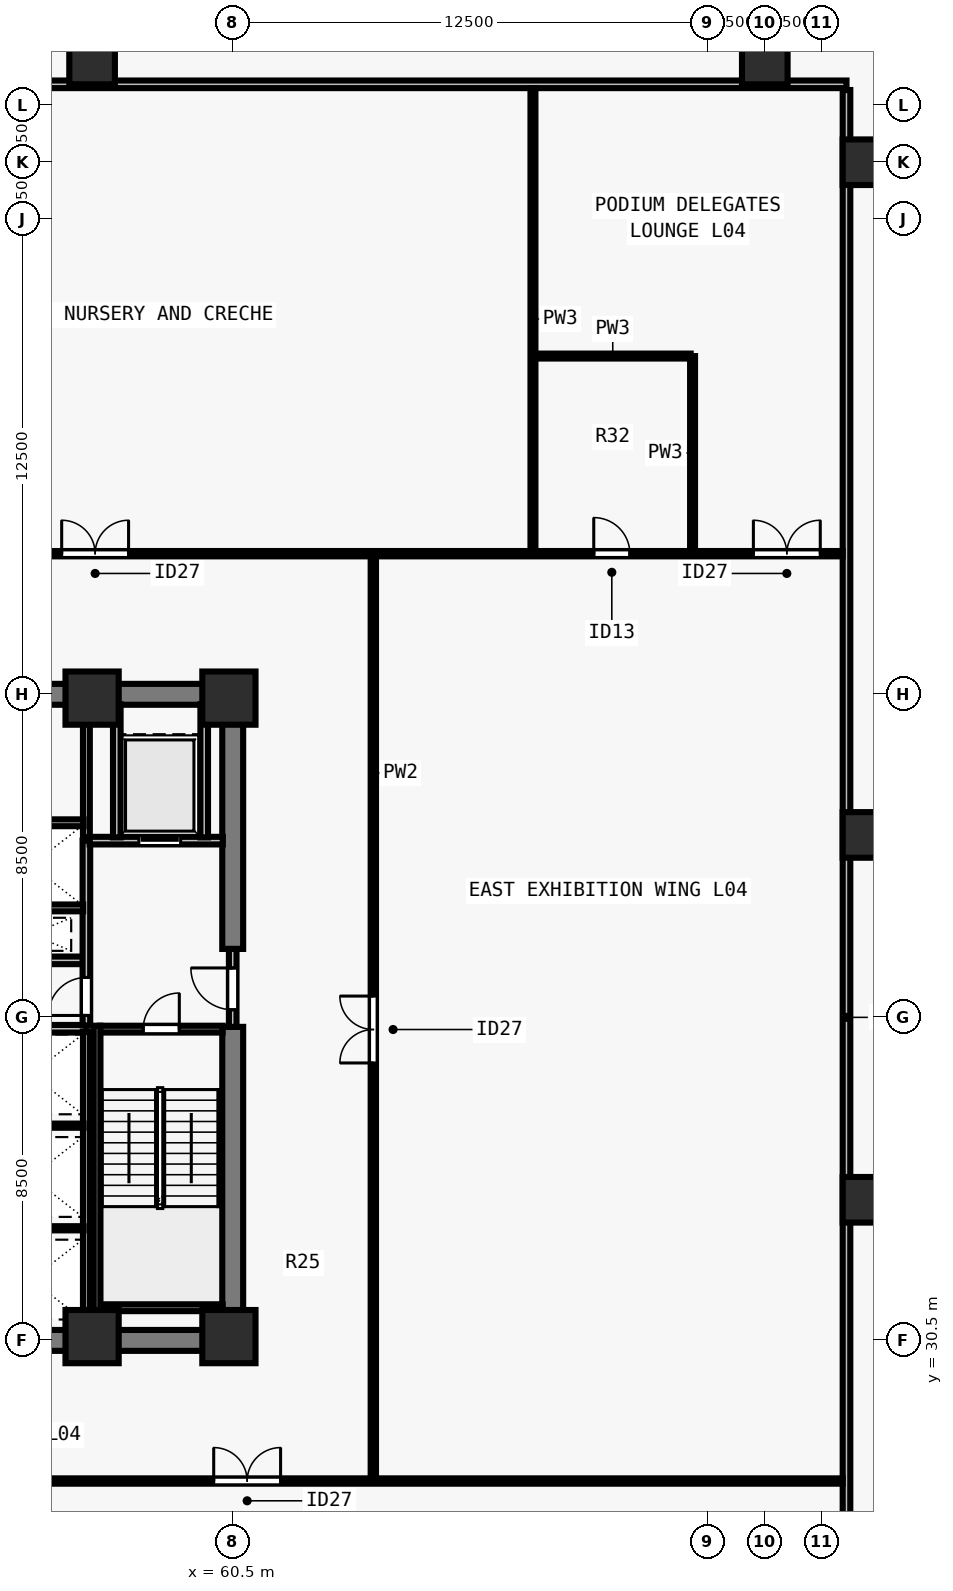
"""IFC4 building model, lengths in metres.
Left out: names, types, materials, properties, quantities, classifications, styles, units other than length and angle.
Written with IfcOpenShell. Run it as: python <this file> out.ifc"""

import sys

from ifc_helpers import new_model, si_unit, direction, frame, frame_2d, origin, origin_2d, place, context, subcontext, project, spatial, rectangle, extrude, element, fill, save


model = new_model("IFC4")
c1 = context("Model", 3, precision=1e-05, world=origin(), true_north=direction((0.0, 1.0)))
c2 = subcontext(c1, "Body", "Model", "MODEL_VIEW")
j1 = project(units=[si_unit("LENGTHUNIT", "METRE"), si_unit("PLANEANGLEUNIT", "RADIAN")], contexts=[c1])
p1 = place(None, origin())
s1 = spatial("IfcSite", under=j1, at=p1, CompositionType="ELEMENT")
p2 = place(p1, origin())
s2 = spatial("IfcBuilding", under=s1, at=p2, CompositionType="ELEMENT")
p3 = place(p2, frame((0.0, 0.0, 19.0)))
s3 = spatial("IfcBuildingStorey", under=s2, at=p3, CompositionType="ELEMENT", Elevation=19.0)
for number, where, z_axis, x_axis in (
    (1, (56.8, 30.6, 0.0), (0.0, 0.0, 1.0), (1.0, 0.0, 0.0)),
    (2, (60.4, 30.6, 0.0), (0.0, 0.0, 1.0), (1.0, 0.0, 0.0)),
    (3, (56.8, 47.4, 0.0), (0.0, 0.0, 1.0), (1.0, 0.0, 0.0)),
    (4, (60.4, 47.4, 0.0), (0.0, 0.0, 1.0), (1.0, 0.0, 0.0)),
):
    element("IfcColumn", number, at=place(p3, frame(where, z_axis=z_axis, x_axis=x_axis)), inside=s3, PredefinedType="COLUMN", context=c2, shape_type="SweptSolid", body=[
        extrude(rectangle(XDim=1.4, YDim=1.4, at=origin_2d()), origin(), (0.0, 0.0, 1.0), 4.5),
    ])
for number, where, z_axis, x_axis in (
    (5, (77.15, 34.2, 0.0), (0.0, 0.0, 1.0), (1.0, 0.0, 0.0)),
    (6, (77.15, 43.8, 0.0), (0.0, 0.0, 1.0), (1.0, 0.0, 0.0)),
    (7, (77.15, 61.5, 0.0), (0.0, 0.0, 1.0), (1.0, 0.0, 0.0)),
    (8, (74.5, 64.15, 0.0), (0.0, 0.0, 1.0), (1.0, 0.0, 0.0)),
    (9, (56.8, 64.15, 0.0), (0.0, 0.0, 1.0), (1.0, 0.0, 0.0)),
):
    element("IfcColumn", number, at=place(p3, frame(where, z_axis=z_axis, x_axis=x_axis)), inside=s3, PredefinedType="COLUMN", context=c2, shape_type="SweptSolid", body=[
        extrude(rectangle(XDim=1.2, YDim=1.2, at=origin_2d()), origin(), (0.0, 0.0, 1.0), 4.5),
    ])
for number, where, z_axis, x_axis in (
    (10, (43.225, 30.5, 0.0), (0.0, 0.0, 1.0), (1.0, 0.0, 0.0)),
    (11, (43.225, 47.5, 0.0), (0.0, 0.0, 1.0), (1.0, 0.0, 0.0)),
):
    element("IfcWall", number, at=place(p3, frame(where, z_axis=z_axis, x_axis=x_axis)), inside=s3, PredefinedType="SHEAR", context=c2, shape_type="SweptSolid", body=[
        extrude(rectangle(XDim=17.55, YDim=0.55, at=frame_2d((8.775, 0.0))), origin(), (0.0, 0.0, 1.0), 4.28),
    ])
p4 = place(p3, frame((60.5, 30.765, 0.0), z_axis=(0.0, 0.0, 1.0), x_axis=(0.0, 1.0, 0.0)))
e12 = element("IfcWall", 12, at=p4, inside=s3, PredefinedType="SHEAR", context=c2, shape_type="SweptSolid", body=[
    extrude(rectangle(XDim=7.985, YDim=0.55, at=frame_2d((3.993, 0.0))), origin(), (0.0, 0.0, 1.0), 4.28),
])
p5 = place(p3, frame((60.5, 40.8, 0.0), z_axis=(0.0, 0.0, 1.0), x_axis=(0.0, 1.0, 0.0)))
e13 = element("IfcWall", 13, at=p5, inside=s3, PredefinedType="SHEAR", context=c2, shape_type="SweptSolid", body=[
    extrude(rectangle(XDim=6.435, YDim=0.55, at=frame_2d((3.218, 0.0))), origin(), (0.0, 0.0, 1.0), 4.28),
])
for number, where, z_axis, x_axis in (
    (14, (53.7, 38.7, 0.0), (0.0, 0.0, 1.0), (1.0, 0.0, 0.0)),
    (15, (53.7, 40.5, 0.0), (0.0, 0.0, 1.0), (1.0, 0.0, 0.0)),
):
    element("IfcWall", number, at=place(p3, frame(where, z_axis=z_axis, x_axis=x_axis)), inside=s3, PredefinedType="SOLIDWALL", context=c2, shape_type="SweptSolid", body=[
        extrude(rectangle(XDim=2.95, YDim=0.2, at=frame_2d((1.475, 0.0))), origin(), (0.0, 0.0, 1.0), 4.28),
    ])
p6 = place(p3, frame((60.5, 38.75, 0.0), z_axis=(0.0, 0.0, 1.0), x_axis=(0.0, 1.0, 0.0)))
e16 = element("IfcWall", 16, at=p6, inside=s3, PredefinedType="SOLIDWALL", context=c2, shape_type="SweptSolid", body=[
    extrude(rectangle(XDim=2.05, YDim=0.2, at=frame_2d((1.025, 0.0))), origin(), (0.0, 0.0, 1.0), 4.28),
])
p7 = place(p6, frame((0.45, 0.0, 0.0)))
e17 = element("IfcOpeningElement", 17, at=p7, cuts=e16, PredefinedType="OPENING", context=c2, shape_type="SweptSolid", body=[
    extrude(rectangle(XDim=1.1, YDim=2.15, at=frame_2d((0.55, 1.075))), frame((0.0, 0.11, 0.0), z_axis=(0.0, -1.0, 0.0), x_axis=(1.0, 0.0, 0.0)), (0.0, 0.0, 1.0), 0.22),
])
p8 = place(p3, frame((56.65, 38.785, 0.0), z_axis=(0.0, 0.0, 1.0), x_axis=(0.0, 1.0, 0.0)))
e18 = element("IfcWall", 18, at=p8, inside=s3, PredefinedType="SOLIDWALL", context=c2, shape_type="SweptSolid", body=[
    extrude(rectangle(XDim=4.865, YDim=0.2, at=frame_2d((2.433, 0.0))), origin(), (0.0, 0.0, 1.0), 4.28),
])
p9 = place(p8, frame((0.265, 0.0, 0.0)))
e19 = element("IfcOpeningElement", 19, at=p9, cuts=e18, PredefinedType="OPENING", context=c2, shape_type="SweptSolid", body=[
    extrude(rectangle(XDim=1.0, YDim=2.15, at=frame_2d((0.5, 1.075))), frame((0.0, 0.11, 0.0), z_axis=(0.0, -1.0, 0.0), x_axis=(1.0, 0.0, 0.0)), (0.0, 0.0, 1.0), 0.22),
])
p10 = place(p3, frame((56.735, 43.65, 0.0), z_axis=(0.0, 0.0, 1.0), x_axis=(1.0, 0.0, 0.0)))
e20 = element("IfcWall", 20, at=p10, inside=s3, PredefinedType="SOLIDWALL", context=c2, shape_type="SweptSolid", body=[
    extrude(rectangle(XDim=3.505, YDim=0.2, at=frame_2d((1.752, 0.0))), origin(), (0.0, 0.0, 1.0), 4.28),
])
p11 = place(p10, frame((1.295, 0.0, 0.0)))
e21 = element("IfcOpeningElement", 21, at=p11, cuts=e20, PredefinedType="OPENING", context=c2, shape_type="SweptSolid", body=[
    extrude(rectangle(XDim=1.1, YDim=2.2, at=frame_2d((0.55, 1.1))), frame((0.0, 0.11, 0.0), z_axis=(0.0, -1.0, 0.0), x_axis=(1.0, 0.0, 0.0)), (0.0, 0.0, 1.0), 0.22),
])
for number, where, z_axis, x_axis in (
    (22, (57.45, 43.735, 0.0), (0.0, 0.0, 1.0), (0.0, 1.0, 0.0)),
    (23, (59.75, 43.735, 0.0), (0.0, 0.0, 1.0), (0.0, 1.0, 0.0)),
):
    element("IfcWall", number, at=place(p3, frame(where, z_axis=z_axis, x_axis=x_axis)), inside=s3, PredefinedType="SOLIDWALL", context=c2, shape_type="SweptSolid", body=[
        extrude(rectangle(XDim=3.505, YDim=0.2, at=frame_2d((1.752, 0.0))), origin(), (0.0, 0.0, 1.0), 4.28),
    ])
p12 = place(p3, frame((56.65, 30.76, 0.0), z_axis=(0.0, 0.0, 1.0), x_axis=(0.0, 1.0, 0.0)))
e24 = element("IfcWall", 24, at=p12, inside=s3, PredefinedType="SOLIDWALL", context=c2, shape_type="SweptSolid", body=[
    extrude(rectangle(XDim=7.855, YDim=0.18, at=frame_2d((3.927, 0.0))), origin(), (0.0, 0.0, 1.0), 4.28),
])
for number, where, z_axis, x_axis in (
    (25, (53.785, 33.45, 0.0), (0.0, 0.0, 1.0), (1.0, 0.0, 0.0)),
    (26, (53.785, 36.15, 0.0), (0.0, 0.0, 1.0), (1.0, 0.0, 0.0)),
):
    element("IfcWall", number, at=place(p3, frame(where, z_axis=z_axis, x_axis=x_axis)), inside=s3, PredefinedType="PARTITIONING", context=c2, shape_type="SweptSolid", body=[
        extrude(rectangle(XDim=2.79, YDim=0.11, at=frame_2d((1.395, 0.0))), origin(), (0.0, 0.0, 1.0), 4.28),
    ])
p13 = place(p3, frame((56.65, 43.735, 0.0), z_axis=(0.0, 0.0, 1.0), x_axis=(0.0, 1.0, 0.0)))
e27 = element("IfcWall", 27, at=p13, inside=s3, PredefinedType="SOLIDWALL", context=c2, shape_type="SweptSolid", body=[
    extrude(rectangle(XDim=3.505, YDim=0.18, at=frame_2d((1.752, 0.0))), origin(), (0.0, 0.0, 1.0), 4.28),
])
p14 = place(p3, frame((53.785, 41.88, 0.0), z_axis=(0.0, 0.0, 1.0), x_axis=(1.0, 0.0, 0.0)))
e28 = element("IfcWall", 28, at=p14, inside=s3, PredefinedType="SOLIDWALL", context=c2, shape_type="SweptSolid", body=[
    extrude(rectangle(XDim=2.78, YDim=0.18, at=frame_2d((1.39, 0.0))), origin(), (0.0, 0.0, 1.0), 4.28),
])
p15 = place(p3, frame((53.785, 44.12, 0.0), z_axis=(0.0, 0.0, 1.0), x_axis=(1.0, 0.0, 0.0)))
e29 = element("IfcWall", 29, at=p15, inside=s3, PredefinedType="SOLIDWALL", context=c2, shape_type="SweptSolid", body=[
    extrude(rectangle(XDim=2.79, YDim=0.18, at=frame_2d((1.395, 0.0))), origin(), (0.0, 0.0, 1.0), 4.28),
])
p16 = place(p3, frame((27.35, 63.55, 0.0), z_axis=(0.0, 0.0, 1.0), x_axis=(1.0, 0.0, 0.0)))
e30 = element("IfcWall", 30, at=p16, inside=s3, PredefinedType="SOLIDWALL", context=c2, shape_type="SweptSolid", body=[
    extrude(rectangle(XDim=49.3, YDim=0.2, at=frame_2d((24.65, 0.0))), origin(), (0.0, 0.0, 1.0), 2.455),
])
p17 = place(p3, frame((76.65, 14.6, 0.0), z_axis=(0.0, 0.0, 1.0), x_axis=(0.0, 1.0, 0.0)))
e31 = element("IfcWall", 31, at=p17, inside=s3, PredefinedType="SOLIDWALL", context=c2, shape_type="SweptSolid", body=[
    extrude(rectangle(XDim=48.8, YDim=0.2, at=frame_2d((24.4, 0.0))), origin(), (0.0, 0.0, 1.0), 2.455),
])
p18 = place(p3, frame((27.45, 26.8, 0.0), z_axis=(0.0, 0.0, 1.0), x_axis=(1.0, 0.0, 0.0)))
e32 = element("IfcWall", 32, at=p18, inside=s3, PredefinedType="PARTITIONING", context=c2, shape_type="SweptSolid", body=[
    extrude(rectangle(XDim=49.1, YDim=0.14, at=frame_2d((24.55, 0.0))), origin(), (0.0, 0.0, 1.0), 3.798),
])
p19 = place(p18, frame((10.33, 0.0, 0.0)))
e33 = element("IfcOpeningElement", 33, at=p19, cuts=e32, PredefinedType="OPENING", context=c2, shape_type="SweptSolid", body=[
    extrude(rectangle(XDim=1.76, YDim=2.2, at=frame_2d((0.88, 1.1))), frame((0.0, 0.08, 0.0), z_axis=(0.0, -1.0, 0.0), x_axis=(1.0, 0.0, 0.0)), (0.0, 0.0, 1.0), 0.16),
])
p20 = place(p18, frame((32.55, 0.0, 0.0)))
e34 = element("IfcOpeningElement", 34, at=p20, cuts=e32, PredefinedType="OPENING", context=c2, shape_type="SweptSolid", body=[
    extrude(rectangle(XDim=1.76, YDim=2.2, at=frame_2d((0.88, 1.1))), frame((0.0, 0.08, 0.0), z_axis=(0.0, -1.0, 0.0), x_axis=(1.0, 0.0, 0.0)), (0.0, 0.0, 1.0), 0.16),
])
p21 = place(p3, frame((27.45, 51.2, 0.0), z_axis=(0.0, 0.0, 1.0), x_axis=(1.0, 0.0, 0.0)))
e35 = element("IfcWall", 35, at=p21, inside=s3, PredefinedType="PARTITIONING", context=c2, shape_type="SweptSolid", body=[
    extrude(rectangle(XDim=49.1, YDim=0.14, at=frame_2d((24.55, 0.0))), origin(), (0.0, 0.0, 1.0), 3.798),
])
p22 = place(p21, frame((15.75, 0.0, 0.0)))
e36 = element("IfcOpeningElement", 36, at=p22, cuts=e35, PredefinedType="OPENING", context=c2, shape_type="SweptSolid", body=[
    extrude(rectangle(XDim=1.76, YDim=2.2, at=frame_2d((0.88, 1.1))), frame((0.0, 0.08, 0.0), z_axis=(0.0, -1.0, 0.0), x_axis=(1.0, 0.0, 0.0)), (0.0, 0.0, 1.0), 0.16),
])
p23 = place(p21, frame((28.55, 0.0, 0.0)))
e37 = element("IfcOpeningElement", 37, at=p23, cuts=e35, PredefinedType="OPENING", context=c2, shape_type="SweptSolid", body=[
    extrude(rectangle(XDim=1.76, YDim=2.2, at=frame_2d((0.88, 1.1))), frame((0.0, 0.08, 0.0), z_axis=(0.0, -1.0, 0.0), x_axis=(1.0, 0.0, 0.0)), (0.0, 0.0, 1.0), 0.16),
])
p24 = place(p21, frame((42.55, 0.0, 0.0)))
e38 = element("IfcOpeningElement", 38, at=p24, cuts=e35, PredefinedType="OPENING", context=c2, shape_type="SweptSolid", body=[
    extrude(rectangle(XDim=0.95, YDim=2.1, at=frame_2d((0.475, 1.05))), frame((0.0, 0.08, 0.0), z_axis=(0.0, -1.0, 0.0), x_axis=(1.0, 0.0, 0.0)), (0.0, 0.0, 1.0), 0.16),
])
p25 = place(p21, frame((46.75, 0.0, 0.0)))
e39 = element("IfcOpeningElement", 39, at=p25, cuts=e35, PredefinedType="OPENING", context=c2, shape_type="SweptSolid", body=[
    extrude(rectangle(XDim=1.76, YDim=2.2, at=frame_2d((0.88, 1.1))), frame((0.0, 0.08, 0.0), z_axis=(0.0, -1.0, 0.0), x_axis=(1.0, 0.0, 0.0)), (0.0, 0.0, 1.0), 0.16),
])
p26 = place(p3, frame((64.2, 26.855, 0.0), z_axis=(0.0, 0.0, 1.0), x_axis=(0.0, 1.0, 0.0)))
e40 = element("IfcWall", 40, at=p26, inside=s3, PredefinedType="PARTITIONING", context=c2, shape_type="SweptSolid", body=[
    extrude(rectangle(XDim=24.29, YDim=0.14, at=frame_2d((12.145, 0.0))), origin(), (0.0, 0.0, 1.0), 4.28),
])
p27 = place(p26, frame((10.945, 0.0, 0.0)))
e41 = element("IfcOpeningElement", 41, at=p27, cuts=e40, PredefinedType="OPENING", context=c2, shape_type="SweptSolid", body=[
    extrude(rectangle(XDim=1.76, YDim=2.2, at=frame_2d((0.88, 1.1))), frame((0.0, 0.08, 0.0), z_axis=(0.0, -1.0, 0.0), x_axis=(1.0, 0.0, 0.0)), (0.0, 0.0, 1.0), 0.16),
])
p28 = place(p3, frame((68.4, 51.3, 0.0), z_axis=(0.0, 0.0, 1.0), x_axis=(0.0, 1.0, 0.0)))
e42 = element("IfcWall", 42, at=p28, inside=s3, PredefinedType="PLUMBINGWALL", context=c2, shape_type="SweptSolid", body=[
    extrude(rectangle(XDim=12.15, YDim=0.13, at=frame_2d((6.075, 0.0))), origin(), (0.0, 0.0, 1.0), 2.455),
])
p29 = place(p3, frame((72.6, 51.3, 0.0), z_axis=(0.0, 0.0, 1.0), x_axis=(0.0, 1.0, 0.0)))
e43 = element("IfcWall", 43, at=p29, inside=s3, PredefinedType="PLUMBINGWALL", context=c2, shape_type="SweptSolid", body=[
    extrude(rectangle(XDim=5.1, YDim=0.13, at=frame_2d((2.55, 0.0))), origin(), (0.0, 0.0, 1.0), 4.28),
])
p30 = place(p3, frame((68.45, 56.4, 0.0), z_axis=(0.0, 0.0, 1.0), x_axis=(1.0, 0.0, 0.0)))
e44 = element("IfcWall", 44, at=p30, inside=s3, PredefinedType="PLUMBINGWALL", context=c2, shape_type="SweptSolid", body=[
    extrude(rectangle(XDim=4.1, YDim=0.13, at=frame_2d((2.05, 0.0))), origin(), (0.0, 0.0, 1.0), 3.798),
])
p31 = place(p3, frame((57.005, 38.69, 0.0), z_axis=(0.0, 0.0, 1.0), x_axis=(1.0, 0.0, 0.0)))
e45 = element("IfcWall", 45, at=p31, inside=s3, PredefinedType="SOLIDWALL", context=c2, shape_type="SweptSolid", body=[
    extrude(rectangle(XDim=3.23, YDim=0.18, at=frame_2d((1.615, 0.0))), origin(), (0.0, 0.0, 1.0), 4.28),
])
p32 = place(p31, frame((1.14, 0.0, 0.0)))
e46 = element("IfcOpeningElement", 46, at=p32, cuts=e45, PredefinedType="OPENING", context=c2, shape_type="SweptSolid", body=[
    extrude(rectangle(XDim=0.95, YDim=2.15, at=frame_2d((0.475, 1.075))), frame((0.0, 0.1, 0.0), z_axis=(0.0, -1.0, 0.0), x_axis=(1.0, 0.0, 0.0)), (0.0, 0.0, 1.0), 0.2),
])
p33 = place(p3, frame((57.005, 31.36, 0.0), z_axis=(0.0, 0.0, 1.0), x_axis=(1.0, 0.0, 0.0)))
e47 = element("IfcWall", 47, at=p33, inside=s3, PredefinedType="SOLIDWALL", context=c2, shape_type="SweptSolid", body=[
    extrude(rectangle(XDim=3.23, YDim=0.18, at=frame_2d((1.615, 0.0))), origin(), (0.0, 0.0, 1.0), 4.28),
])
p34 = place(p3, frame((56.93, 38.78, 0.0), z_axis=(0.0, 0.0, 1.0), x_axis=(0.0, -1.0, 0.0)))
e48 = element("IfcWall", 48, at=p34, inside=s3, PredefinedType="SOLIDWALL", context=c2, shape_type="SweptSolid", body=[
    extrude(rectangle(XDim=8.017, YDim=0.18, at=frame_2d((4.009, 0.0))), origin(), (0.0, 0.0, 1.0), 4.28),
])
p35 = place(p7, origin())
e49 = element("IfcDoor", 49, at=p35, inside=s3, OperationType="SINGLE_SWING_RIGHT", PredefinedType="DOOR", context=c2, shape_type="SweptSolid", body=[
    extrude(rectangle(XDim=1.1, YDim=2.15, at=frame_2d((0.55, 1.075))), frame((0.0, 0.025, 0.0), z_axis=(0.0, -1.0, 0.0), x_axis=(1.0, 0.0, 0.0)), (0.0, 0.0, 1.0), 0.05),
])
fill(e17, e49)
p36 = place(p9, origin())
e50 = element("IfcDoor", 50, at=p36, inside=s3, OperationType="SINGLE_SWING_LEFT", PredefinedType="DOOR", context=c2, shape_type="SweptSolid", body=[
    extrude(rectangle(XDim=1.0, YDim=2.15, at=frame_2d((0.5, 1.075))), frame((0.0, 0.025, 0.0), z_axis=(0.0, -1.0, 0.0), x_axis=(1.0, 0.0, 0.0)), (0.0, 0.0, 1.0), 0.05),
])
fill(e19, e50)
p37 = place(p11, origin())
e51 = element("IfcDoor", 51, at=p37, inside=s3, OperationType="SLIDING_TO_LEFT", PredefinedType="DOOR", context=c2, shape_type="SweptSolid", body=[
    extrude(rectangle(XDim=1.1, YDim=2.2, at=frame_2d((0.55, 1.1))), frame((0.0, 0.025, 0.0), z_axis=(0.0, -1.0, 0.0), x_axis=(1.0, 0.0, 0.0)), (0.0, 0.0, 1.0), 0.05),
])
fill(e21, e51)
p38 = place(p20, origin())
e52 = element("IfcDoor", 52, at=p38, inside=s3, OperationType="DOUBLE_DOOR_SINGLE_SWING", PredefinedType="DOOR", context=c2, shape_type="SweptSolid", body=[
    extrude(rectangle(XDim=1.76, YDim=2.2, at=frame_2d((0.88, 1.1))), frame((0.0, 0.025, 0.0), z_axis=(0.0, -1.0, 0.0), x_axis=(1.0, 0.0, 0.0)), (0.0, 0.0, 1.0), 0.05),
])
fill(e34, e52)
p39 = place(p23, origin())
e53 = element("IfcDoor", 53, at=p39, inside=s3, OperationType="DOUBLE_DOOR_SINGLE_SWING", PredefinedType="DOOR", context=c2, shape_type="SweptSolid", body=[
    extrude(rectangle(XDim=1.76, YDim=2.2, at=frame_2d((0.88, 1.1))), frame((0.0, 0.025, 0.0), z_axis=(0.0, -1.0, 0.0), x_axis=(1.0, 0.0, 0.0)), (0.0, 0.0, 1.0), 0.05),
])
fill(e37, e53)
p40 = place(p24, origin())
e54 = element("IfcDoor", 54, at=p40, inside=s3, OperationType="SINGLE_SWING_LEFT", PredefinedType="DOOR", context=c2, shape_type="SweptSolid", body=[
    extrude(rectangle(XDim=0.95, YDim=2.1, at=frame_2d((0.475, 1.05))), frame((0.0, 0.025, 0.0), z_axis=(0.0, -1.0, 0.0), x_axis=(1.0, 0.0, 0.0)), (0.0, 0.0, 1.0), 0.05),
])
fill(e38, e54)
p41 = place(p25, origin())
e55 = element("IfcDoor", 55, at=p41, inside=s3, OperationType="DOUBLE_DOOR_SINGLE_SWING", PredefinedType="DOOR", context=c2, shape_type="SweptSolid", body=[
    extrude(rectangle(XDim=1.76, YDim=2.2, at=frame_2d((0.88, 1.1))), frame((0.0, 0.025, 0.0), z_axis=(0.0, -1.0, 0.0), x_axis=(1.0, 0.0, 0.0)), (0.0, 0.0, 1.0), 0.05),
])
fill(e39, e55)
p42 = place(p27, origin())
e56 = element("IfcDoor", 56, at=p42, inside=s3, OperationType="DOUBLE_DOOR_SINGLE_SWING", PredefinedType="DOOR", context=c2, shape_type="SweptSolid", body=[
    extrude(rectangle(XDim=1.76, YDim=2.2, at=frame_2d((0.88, 1.1))), frame((0.0, 0.025, 0.0), z_axis=(0.0, -1.0, 0.0), x_axis=(1.0, 0.0, 0.0)), (0.0, 0.0, 1.0), 0.05),
])
fill(e41, e56)
p43 = place(p32, origin())
e57 = element("IfcDoor", 57, at=p43, inside=s3, OperationType="SINGLE_SWING_RIGHT", PredefinedType="DOOR", context=c2, shape_type="SweptSolid", body=[
    extrude(rectangle(XDim=0.95, YDim=2.15, at=frame_2d((0.475, 1.075))), frame((0.0, 0.025, 0.0), z_axis=(0.0, -1.0, 0.0), x_axis=(1.0, 0.0, 0.0)), (0.0, 0.0, 1.0), 0.05),
])
fill(e46, e57)
save(model, sys.argv[1])
